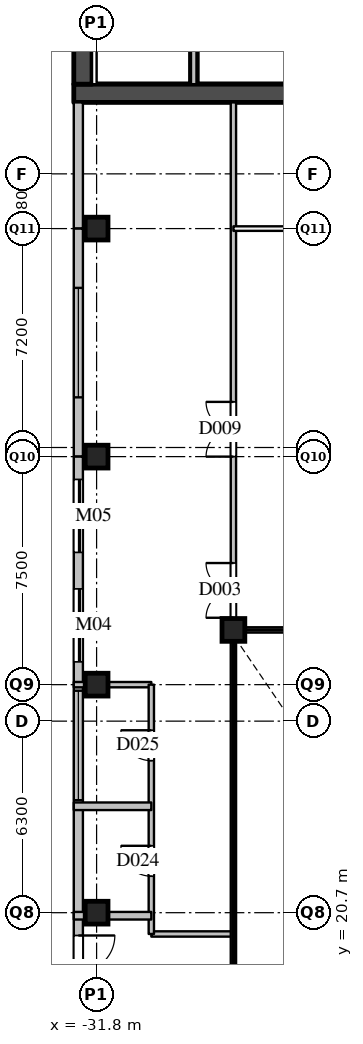
"""IFC4 building model, lengths in metres.
Left out: names, types, materials, properties, quantities, classifications, styles, units other than length and angle.
Written with IfcOpenShell. Run it as: python <this file> out.ifc"""

import sys

from ifc_helpers import new_model, si_unit, direction, frame, frame_2d, origin, origin_2d, place, context, subcontext, project, spatial, rectangle, extrude, element, fill, save


model = new_model("IFC4")
c1 = context("Model", 3, precision=1e-05, world=origin(), true_north=direction((0.0, 1.0)))
c2 = subcontext(c1, "Body", "Model", "MODEL_VIEW")
j1 = project(units=[si_unit("LENGTHUNIT", "METRE"), si_unit("PLANEANGLEUNIT", "RADIAN")], contexts=[c1])
p1 = place(None, origin())
s1 = spatial("IfcSite", under=j1, at=p1, CompositionType="ELEMENT")
p2 = place(p1, origin())
s2 = spatial("IfcBuilding", under=s1, at=p2, CompositionType="ELEMENT")
p3 = place(p2, origin())
s3 = spatial("IfcBuildingStorey", under=s2, at=p3, CompositionType="ELEMENT", Elevation=0.0)
for number, where, z_axis, x_axis in (
    (1, (-31.8, 20.7, 0.0), (0.0, 0.0, 1.0), (1.0, 0.0, 0.0)),
    (2, (-31.8, 28.2, 0.0), (0.0, 0.0, 1.0), (1.0, 0.0, 0.0)),
    (3, (-31.8, 35.7, 0.0), (0.0, 0.0, 1.0), (1.0, 0.0, 0.0)),
    (4, (-31.8, 43.2, 0.0), (0.0, 0.0, 1.0), (1.0, 0.0, 0.0)),
    (5, (-27.3, 30.0, 0.0), (0.0, 0.0, 1.0), (1.0, 0.0, 0.0)),
):
    element("IfcColumn", number, at=place(p3, frame(where, z_axis=z_axis, x_axis=x_axis)), inside=s3, PredefinedType="COLUMN", context=c2, shape_type="SweptSolid", body=[
        extrude(rectangle(XDim=0.75, YDim=0.75, at=origin_2d()), origin(), (0.0, 0.0, 1.0), 8.0),
    ])
p4 = place(p3, frame((-32.4, 47.35, 0.0), z_axis=(0.0, 0.0, 1.0), x_axis=(0.0, -1.0, 0.0)))
e6 = element("IfcWall", 6, at=p4, inside=s3, PredefinedType="SOLIDWALL", context=c2, shape_type="SweptSolid", body=[
    extrude(rectangle(XDim=4.15, YDim=0.3, at=frame_2d((2.075, 0.0))), origin(), (0.0, 0.0, 1.0), 7.59),
])
p5 = place(p3, frame((-32.4, 43.2, 0.0), z_axis=(0.0, 0.0, 1.0), x_axis=(0.0, -1.0, 0.0)))
e7 = element("IfcWall", 7, at=p5, inside=s3, PredefinedType="SOLIDWALL", context=c2, shape_type="SweptSolid", body=[
    extrude(rectangle(XDim=7.5, YDim=0.3, at=frame_2d((3.75, 0.0))), origin(), (0.0, 0.0, 1.0), 7.59),
])
p6 = place(p5, frame((1.95, 0.0, 0.9)))
e8 = element("IfcOpeningElement", 8, at=p6, cuts=e7, PredefinedType="OPENING", context=c2, shape_type="SweptSolid", body=[
    extrude(rectangle(XDim=3.6, YDim=3.0, at=frame_2d((1.8, 1.5))), frame((0.0, 0.16, 0.0), z_axis=(0.0, -1.0, 0.0), x_axis=(1.0, 0.0, 0.0)), (0.0, 0.0, 1.0), 0.32),
])
p7 = place(p3, frame((-32.4, 35.7, 0.0), z_axis=(0.0, 0.0, 1.0), x_axis=(0.0, -1.0, 0.0)))
e9 = element("IfcWall", 9, at=p7, inside=s3, PredefinedType="SOLIDWALL", context=c2, shape_type="SweptSolid", body=[
    extrude(rectangle(XDim=7.5, YDim=0.3, at=frame_2d((3.75, 0.0))), origin(), (0.0, 0.0, 1.0), 7.59),
])
p8 = place(p7, frame((4.35, 0.0, 0.0)))
e10 = element("IfcOpeningElement", 10, at=p8, cuts=e9, PredefinedType="OPENING", context=c2, shape_type="SweptSolid", body=[
    extrude(rectangle(XDim=2.4, YDim=2.4, at=frame_2d((1.2, 1.2))), frame((0.0, 0.16, 0.0), z_axis=(0.0, -1.0, 0.0), x_axis=(1.0, 0.0, 0.0)), (0.0, 0.0, 1.0), 0.32),
])
p9 = place(p7, frame((0.75, 0.0, 0.0)))
e11 = element("IfcOpeningElement", 11, at=p9, cuts=e9, PredefinedType="OPENING", context=c2, shape_type="SweptSolid", body=[
    extrude(rectangle(XDim=2.4, YDim=2.4, at=frame_2d((1.2, 1.2))), frame((0.0, 0.16, 0.0), z_axis=(0.0, -1.0, 0.0), x_axis=(1.0, 0.0, 0.0)), (0.0, 0.0, 1.0), 0.32),
])
p10 = place(p3, frame((-32.4, 28.2, 0.0), z_axis=(0.0, 0.0, 1.0), x_axis=(0.0, -1.0, 0.0)))
e12 = element("IfcWall", 12, at=p10, inside=s3, PredefinedType="SOLIDWALL", context=c2, shape_type="SweptSolid", body=[
    extrude(rectangle(XDim=7.5, YDim=0.3, at=frame_2d((3.75, 0.0))), origin(), (0.0, 0.0, 1.0), 7.59),
])
p11 = place(p10, frame((0.2, 0.0, 0.9)))
e13 = element("IfcOpeningElement", 13, at=p11, cuts=e12, PredefinedType="OPENING", context=c2, shape_type="SweptSolid", body=[
    extrude(rectangle(XDim=3.6, YDim=3.0, at=frame_2d((1.8, 1.5))), frame((0.0, 0.16, 0.0), z_axis=(0.0, -1.0, 0.0), x_axis=(1.0, 0.0, 0.0)), (0.0, 0.0, 1.0), 0.32),
])
p12 = place(p3, frame((-32.4, 20.7, 0.0), z_axis=(0.0, 0.0, 1.0), x_axis=(0.0, -1.0, 0.0)))
e14 = element("IfcWall", 14, at=p12, inside=s3, PredefinedType="SOLIDWALL", context=c2, shape_type="SweptSolid", body=[
    extrude(rectangle(XDim=7.5, YDim=0.3, at=frame_2d((3.75, 0.0))), origin(), (0.0, 0.0, 1.0), 7.59),
])
p13 = place(p12, frame((4.35, 0.0, 0.0)))
e15 = element("IfcOpeningElement", 15, at=p13, cuts=e14, PredefinedType="OPENING", context=c2, shape_type="SweptSolid", body=[
    extrude(rectangle(XDim=2.4, YDim=2.7, at=frame_2d((1.2, 1.35))), frame((0.0, 0.16, 0.0), z_axis=(0.0, -1.0, 0.0), x_axis=(1.0, 0.0, 0.0)), (0.0, 0.0, 1.0), 0.32),
])
p14 = place(p12, frame((0.75, 0.0, 0.0)))
e16 = element("IfcOpeningElement", 16, at=p14, cuts=e14, PredefinedType="OPENING", context=c2, shape_type="SweptSolid", body=[
    extrude(rectangle(XDim=2.4, YDim=2.7, at=frame_2d((1.2, 1.35))), frame((0.0, 0.16, 0.0), z_axis=(0.0, -1.0, 0.0), x_axis=(1.0, 0.0, 0.0)), (0.0, 0.0, 1.0), 0.32),
])
p15 = place(p3, frame((-32.55, 47.65, 0.0), z_axis=(0.0, 0.0, 1.0), x_axis=(1.0, 0.0, 0.0)))
e17 = element("IfcWall", 17, at=p15, inside=s3, PredefinedType="SHEAR", context=c2, shape_type="SweptSolid", body=[
    extrude(rectangle(XDim=12.2, YDim=0.6, at=frame_2d((6.1, 0.0))), origin(), (0.0, 0.0, 1.0), 7.59),
])
p16 = place(p15, frame((8.0, 0.0, 0.0)))
e18 = element("IfcOpeningElement", 18, at=p16, cuts=e17, PredefinedType="OPENING", context=c2, shape_type="SweptSolid", body=[
    extrude(rectangle(XDim=0.7, YDim=2.1, at=frame_2d((0.35, 1.05))), frame((0.0, 0.31, 0.0), z_axis=(0.0, -1.0, 0.0), x_axis=(1.0, 0.0, 0.0)), (0.0, 0.0, 1.0), 0.62),
])
p17 = place(p3, frame((-32.25, 47.95, 0.0), z_axis=(0.0, 0.0, 1.0), x_axis=(0.0, 1.0, 0.0)))
e19 = element("IfcWall", 19, at=p17, inside=s3, PredefinedType="SHEAR", context=c2, shape_type="SweptSolid", body=[
    extrude(rectangle(XDim=10.4, YDim=0.6, at=frame_2d((5.2, 0.0))), origin(), (0.0, 0.0, 1.0), 7.59),
])
p18 = place(p17, frame((6.25, 0.0, 0.0)))
e20 = element("IfcOpeningElement", 20, at=p18, cuts=e19, PredefinedType="OPENING", context=c2, shape_type="SweptSolid", body=[
    extrude(rectangle(XDim=1.8, YDim=2.4, at=frame_2d((0.9, 1.2))), frame((0.0, 0.31, 0.0), z_axis=(0.0, -1.0, 0.0), x_axis=(1.0, 0.0, 0.0)), (0.0, 0.0, 1.0), 0.62),
])
p19 = place(p17, frame((8.05, 0.0, 0.0)))
e21 = element("IfcOpeningElement", 21, at=p19, cuts=e19, PredefinedType="OPENING", context=c2, shape_type="SweptSolid", body=[
    extrude(rectangle(XDim=1.8, YDim=2.4, at=frame_2d((0.9, 1.2))), frame((0.0, 0.31, 0.0), z_axis=(0.0, -1.0, 0.0), x_axis=(1.0, 0.0, 0.0)), (0.0, 0.0, 1.0), 0.62),
])
p20 = place(p3, frame((-28.6, 47.95, 0.0), z_axis=(0.0, 0.0, 1.0), x_axis=(0.0, 1.0, 0.0)))
e22 = element("IfcWall", 22, at=p20, inside=s3, PredefinedType="SOLIDWALL", context=c2, shape_type="SweptSolid", body=[
    extrude(rectangle(XDim=2.08, YDim=0.2, at=frame_2d((1.04, 0.0))), origin(), (0.0, 0.0, 1.0), 7.59),
])
p21 = place(p3, frame((-30.0, 20.0, 0.0), z_axis=(0.0, 0.0, 1.0), x_axis=(1.0, 0.0, 0.0)))
e23 = element("IfcWall", 23, at=p21, inside=s3, PredefinedType="PARTITIONING", context=c2, shape_type="SweptSolid", body=[
    extrude(rectangle(XDim=2.7, YDim=0.175, at=frame_2d((1.35, 0.0))), origin(), (0.0, 0.0, 1.0), 7.59),
])
p22 = place(p3, frame((-32.55, 28.2, 0.0), z_axis=(0.0, 0.0, 1.0), x_axis=(1.0, 0.0, 0.0)))
e24 = element("IfcWall", 24, at=p22, inside=s3, PredefinedType="PARTITIONING", context=c2, shape_type="SweptSolid", body=[
    extrude(rectangle(XDim=2.55, YDim=0.175, at=frame_2d((1.275, 0.0))), origin(), (0.0, 0.0, 1.0), 7.59),
])
p23 = place(p3, frame((-27.3, 30.0, 0.0), z_axis=(0.0, 0.0, 1.0), x_axis=(1.0, 0.0, 0.0)))
e25 = element("IfcWall", 25, at=p23, inside=s3, PredefinedType="PARTITIONING", context=c2, shape_type="SweptSolid", body=[
    extrude(rectangle(XDim=12.0, YDim=0.175, at=frame_2d((6.0, 0.0))), origin(), (0.0, 0.0, 1.0), 7.59),
])
p24 = place(p3, frame((-30.0, 20.0, 0.0), z_axis=(0.0, 0.0, 1.0), x_axis=(0.0, 1.0, 0.0)))
e26 = element("IfcWall", 26, at=p24, inside=s3, PredefinedType="PARTITIONING", context=c2, shape_type="SweptSolid", body=[
    extrude(rectangle(XDim=8.2, YDim=0.175, at=frame_2d((4.1, 0.0))), origin(), (0.0, 0.0, 1.0), 7.59),
])
p25 = place(p24, frame((1.9, 0.0, 0.0)))
e27 = element("IfcOpeningElement", 27, at=p25, cuts=e26, PredefinedType="OPENING", context=c2, shape_type="SweptSolid", body=[
    extrude(rectangle(XDim=1.0, YDim=2.1, at=frame_2d((0.5, 1.05))), frame((0.0, 0.097, 0.0), z_axis=(0.0, -1.0, 0.0), x_axis=(1.0, 0.0, 0.0)), (0.0, 0.0, 1.0), 0.195),
])
p26 = place(p24, frame((5.7, 0.0, 0.0)))
e28 = element("IfcOpeningElement", 28, at=p26, cuts=e26, PredefinedType="OPENING", context=c2, shape_type="SweptSolid", body=[
    extrude(rectangle(XDim=1.0, YDim=2.1, at=frame_2d((0.5, 1.05))), frame((0.0, 0.097, 0.0), z_axis=(0.0, -1.0, 0.0), x_axis=(1.0, 0.0, 0.0)), (0.0, 0.0, 1.0), 0.195),
])
p27 = place(p3, frame((-27.3, 12.0, 0.0), z_axis=(0.0, 0.0, 1.0), x_axis=(0.0, 1.0, 0.0)))
e29 = element("IfcWall", 29, at=p27, inside=s3, PredefinedType="PARTITIONING", context=c2, shape_type="SweptSolid", body=[
    extrude(rectangle(XDim=35.35, YDim=0.175, at=frame_2d((17.675, 0.0))), origin(), (0.0, 0.0, 1.0), 6.79),
])
p28 = place(p27, frame((18.4, 0.0, 0.0)))
e30 = element("IfcOpeningElement", 30, at=p28, cuts=e29, PredefinedType="OPENING", context=c2, shape_type="SweptSolid", body=[
    extrude(rectangle(XDim=1.8, YDim=2.1, at=frame_2d((0.9, 1.05))), frame((0.0, 0.097, 0.0), z_axis=(0.0, -1.0, 0.0), x_axis=(1.0, 0.0, 0.0)), (0.0, 0.0, 1.0), 0.195),
])
p29 = place(p27, frame((23.7, 0.0, 0.0)))
e31 = element("IfcOpeningElement", 31, at=p29, cuts=e29, PredefinedType="OPENING", context=c2, shape_type="SweptSolid", body=[
    extrude(rectangle(XDim=1.8, YDim=2.1, at=frame_2d((0.9, 1.05))), frame((0.0, 0.097, 0.0), z_axis=(0.0, -1.0, 0.0), x_axis=(1.0, 0.0, 0.0)), (0.0, 0.0, 1.0), 0.195),
])
p30 = place(p27, frame((4.688, 0.0, 0.0)))
e32 = element("IfcOpeningElement", 32, at=p30, cuts=e29, PredefinedType="OPENING", context=c2, shape_type="SweptSolid", body=[
    extrude(rectangle(XDim=1.0, YDim=2.1, at=frame_2d((0.5, 1.05))), frame((0.0, 0.097, 0.0), z_axis=(0.0, -1.0, 0.0), x_axis=(1.0, 0.0, 0.0)), (0.0, 0.0, 1.0), 0.195),
])
p31 = place(p3, frame((-27.3, 43.2, 0.0), z_axis=(0.0, 0.0, 1.0), x_axis=(1.0, 0.0, 0.0)))
e33 = element("IfcWall", 33, at=p31, inside=s3, PredefinedType="PARTITIONING", context=c2, shape_type="SweptSolid", body=[
    extrude(rectangle(XDim=15.0, YDim=0.15, at=frame_2d((7.5, 0.0))), origin(), (0.0, 0.0, 1.0), 6.79),
])
p32 = place(p3, frame((-32.55, 20.6, 0.0), z_axis=(0.0, 0.0, 1.0), x_axis=(1.0, 0.0, 0.0)))
e34 = element("IfcWall", 34, at=p32, inside=s3, PredefinedType="PARTITIONING", context=c2, shape_type="SweptSolid", body=[
    extrude(rectangle(XDim=2.55, YDim=0.25, at=frame_2d((1.275, 0.0))), origin(), (0.0, 0.0, 1.0), 7.59),
])
p33 = place(p3, frame((-32.55, 24.2, 0.0), z_axis=(0.0, 0.0, 1.0), x_axis=(1.0, 0.0, 0.0)))
e35 = element("IfcWall", 35, at=p33, inside=s3, PredefinedType="PARTITIONING", context=c2, shape_type="SweptSolid", body=[
    extrude(rectangle(XDim=2.55, YDim=0.25, at=frame_2d((1.275, 0.0))), origin(), (0.0, 0.0, 1.0), 6.79),
])
p34 = place(p6, origin())
e36 = element("IfcWindow", 36, at=p34, inside=s3, PartitioningType="SINGLE_PANEL", PredefinedType="WINDOW", context=c2, shape_type="SweptSolid", body=[
    extrude(rectangle(XDim=3.6, YDim=3.0, at=frame_2d((1.8, 1.5))), frame((0.0, 0.03, 0.0), z_axis=(0.0, -1.0, 0.0), x_axis=(1.0, 0.0, 0.0)), (0.0, 0.0, 1.0), 0.06),
])
fill(e8, e36)
p35 = place(p8, origin())
e37 = element("IfcDoor", 37, at=p35, inside=s3, OperationType="SLIDING_TO_LEFT", PredefinedType="DOOR", context=c2, shape_type="SweptSolid", body=[
    extrude(rectangle(XDim=2.4, YDim=2.4, at=frame_2d((1.2, 1.2))), frame((0.0, 0.025, 0.0), z_axis=(0.0, -1.0, 0.0), x_axis=(1.0, 0.0, 0.0)), (0.0, 0.0, 1.0), 0.05),
])
fill(e10, e37)
p36 = place(p9, origin())
e38 = element("IfcDoor", 38, at=p36, inside=s3, OperationType="SLIDING_TO_LEFT", PredefinedType="DOOR", context=c2, shape_type="SweptSolid", body=[
    extrude(rectangle(XDim=2.4, YDim=2.4, at=frame_2d((1.2, 1.2))), frame((0.0, 0.025, 0.0), z_axis=(0.0, -1.0, 0.0), x_axis=(1.0, 0.0, 0.0)), (0.0, 0.0, 1.0), 0.05),
])
fill(e11, e38)
p37 = place(p11, origin())
e39 = element("IfcWindow", 39, at=p37, inside=s3, PartitioningType="SINGLE_PANEL", PredefinedType="WINDOW", context=c2, shape_type="SweptSolid", body=[
    extrude(rectangle(XDim=3.6, YDim=3.0, at=frame_2d((1.8, 1.5))), frame((0.0, 0.03, 0.0), z_axis=(0.0, -1.0, 0.0), x_axis=(1.0, 0.0, 0.0)), (0.0, 0.0, 1.0), 0.06),
])
fill(e13, e39)
p38 = place(p14, origin())
e40 = element("IfcDoor", 40, at=p38, inside=s3, OperationType="DOUBLE_DOOR_SINGLE_SWING", PredefinedType="DOOR", context=c2, shape_type="SweptSolid", body=[
    extrude(rectangle(XDim=2.4, YDim=2.7, at=frame_2d((1.2, 1.35))), frame((0.0, 0.025, 0.0), z_axis=(0.0, -1.0, 0.0), x_axis=(1.0, 0.0, 0.0)), (0.0, 0.0, 1.0), 0.05),
])
fill(e16, e40)
p39 = place(p28, origin())
e41 = element("IfcDoor", 41, at=p39, inside=s3, OperationType="DOUBLE_DOOR_SINGLE_SWING", PredefinedType="DOOR", context=c2, shape_type="SweptSolid", body=[
    extrude(rectangle(XDim=1.8, YDim=2.1, at=frame_2d((0.9, 1.05))), frame((0.0, 0.025, 0.0), z_axis=(0.0, -1.0, 0.0), x_axis=(1.0, 0.0, 0.0)), (0.0, 0.0, 1.0), 0.05),
])
fill(e30, e41)
p40 = place(p29, origin())
e42 = element("IfcDoor", 42, at=p40, inside=s3, OperationType="DOUBLE_DOOR_SINGLE_SWING", PredefinedType="DOOR", context=c2, shape_type="SweptSolid", body=[
    extrude(rectangle(XDim=1.8, YDim=2.1, at=frame_2d((0.9, 1.05))), frame((0.0, 0.025, 0.0), z_axis=(0.0, -1.0, 0.0), x_axis=(1.0, 0.0, 0.0)), (0.0, 0.0, 1.0), 0.05),
])
fill(e31, e42)
p41 = place(p25, origin())
e43 = element("IfcDoor", 43, at=p41, inside=s3, OperationType="SINGLE_SWING_RIGHT", PredefinedType="DOOR", context=c2, shape_type="SweptSolid", body=[
    extrude(rectangle(XDim=1.0, YDim=2.1, at=frame_2d((0.5, 1.05))), frame((0.0, 0.025, 0.0), z_axis=(0.0, -1.0, 0.0), x_axis=(1.0, 0.0, 0.0)), (0.0, 0.0, 1.0), 0.05),
])
fill(e27, e43)
p42 = place(p26, origin())
e44 = element("IfcDoor", 44, at=p42, inside=s3, OperationType="SINGLE_SWING_RIGHT", PredefinedType="DOOR", context=c2, shape_type="SweptSolid", body=[
    extrude(rectangle(XDim=1.0, YDim=2.1, at=frame_2d((0.5, 1.05))), frame((0.0, 0.025, 0.0), z_axis=(0.0, -1.0, 0.0), x_axis=(1.0, 0.0, 0.0)), (0.0, 0.0, 1.0), 0.05),
])
fill(e28, e44)
save(model, sys.argv[1])
